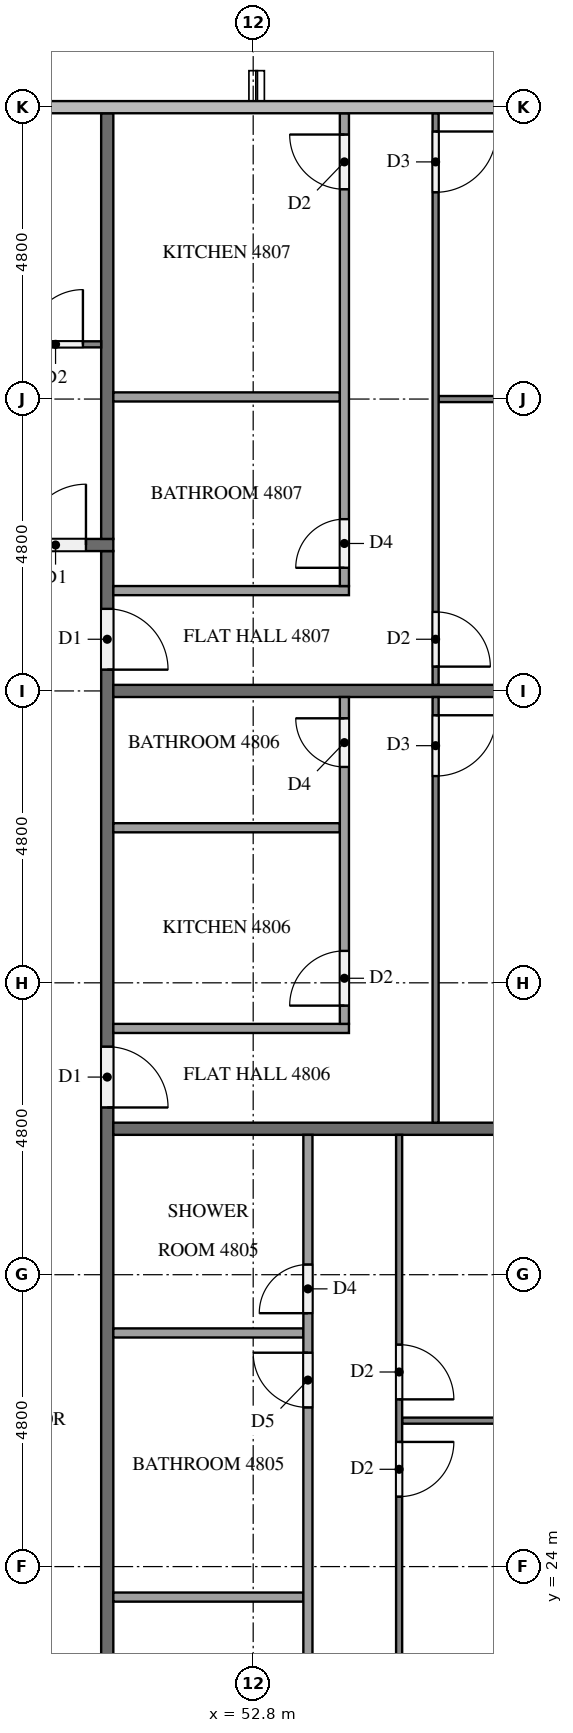
"""IFC4 building model, lengths in metres.
Left out: names, types, materials, properties, quantities, classifications, styles, units other than length and angle.
Written with IfcOpenShell. Run it as: python <this file> out.ifc"""

import sys

from ifc_helpers import new_model, si_unit, direction, frame, frame_2d, origin, place, context, subcontext, project, spatial, rectangle, extrude, element, fill, save


model = new_model("IFC4")
c1 = context("Model", 3, precision=1e-05, world=origin(), true_north=direction((0.0, 1.0)))
c2 = subcontext(c1, "Body", "Model", "MODEL_VIEW")
j1 = project(units=[si_unit("LENGTHUNIT", "METRE"), si_unit("PLANEANGLEUNIT", "RADIAN")], contexts=[c1])
p1 = place(None, origin())
s1 = spatial("IfcSite", under=j1, at=p1, CompositionType="ELEMENT")
p2 = place(p1, origin())
s2 = spatial("IfcBuilding", under=s1, at=p2, CompositionType="ELEMENT")
p3 = place(p2, frame((0.0, 0.0, 185.9)))
s3 = spatial("IfcBuildingStorey", under=s2, at=p3, CompositionType="ELEMENT", Elevation=185.9)
p4 = place(p3, frame((50.4, 40.7, 0.0), z_axis=(0.0, 0.0, 1.0), x_axis=(0.0, -1.0, 0.0)))
e1 = element("IfcWall", 1, at=p4, inside=s3, PredefinedType="PARTITIONING", context=c2, shape_type="SweptSolid", body=[
    extrude(rectangle(XDim=28.6, YDim=0.2, at=frame_2d((14.3, 0.0))), origin(), (0.0, 0.0, 1.0), 3.2),
])
p5 = place(p4, frame((27.3, 0.0, 0.0)))
e2 = element("IfcOpeningElement", 2, at=p5, cuts=e1, PredefinedType="OPENING", context=c2, shape_type="SweptSolid", body=[
    extrude(rectangle(XDim=1.1, YDim=2.1, at=frame_2d((0.55, 1.05))), frame((0.0, 0.11, 0.0), z_axis=(0.0, -1.0, 0.0), x_axis=(1.0, 0.0, 0.0)), (0.0, 0.0, 1.0), 0.22),
])
p6 = place(p4, frame((8.15, 0.0, 0.0)))
e3 = element("IfcOpeningElement", 3, at=p6, cuts=e1, PredefinedType="OPENING", context=c2, shape_type="SweptSolid", body=[
    extrude(rectangle(XDim=1.0, YDim=2.1, at=frame_2d((0.5, 1.05))), frame((0.0, 0.11, 0.0), z_axis=(0.0, -1.0, 0.0), x_axis=(1.0, 0.0, 0.0)), (0.0, 0.0, 1.0), 0.22),
])
p7 = place(p4, frame((0.95, 0.0, 0.0)))
e4 = element("IfcOpeningElement", 4, at=p7, cuts=e1, PredefinedType="OPENING", context=c2, shape_type="SweptSolid", body=[
    extrude(rectangle(XDim=1.0, YDim=2.1, at=frame_2d((0.5, 1.05))), frame((0.0, 0.11, 0.0), z_axis=(0.0, -1.0, 0.0), x_axis=(1.0, 0.0, 0.0)), (0.0, 0.0, 1.0), 0.22),
])
p8 = place(p3, frame((11.9, 40.8, 0.0), z_axis=(0.0, 0.0, 1.0), x_axis=(1.0, 0.0, 0.0)))
e5 = element("IfcWall", 5, at=p8, inside=s3, PredefinedType="PARTITIONING", context=c2, shape_type="SweptSolid", body=[
    extrude(rectangle(XDim=38.6, YDim=0.2, at=frame_2d((19.3, 0.0))), origin(), (0.0, 0.0, 1.0), 3.2),
])
p9 = place(p8, frame((37.15, 0.0, 0.0)))
e6 = element("IfcOpeningElement", 6, at=p9, cuts=e5, PredefinedType="OPENING", context=c2, shape_type="SweptSolid", body=[
    extrude(rectangle(XDim=1.0, YDim=2.1, at=frame_2d((0.5, 1.05))), frame((0.0, 0.11, 0.0), z_axis=(0.0, -1.0, 0.0), x_axis=(1.0, 0.0, 0.0)), (0.0, 0.0, 1.0), 0.22),
])
p10 = place(p8, frame((20.35, 0.0, 0.0)))
e7 = element("IfcOpeningElement", 7, at=p10, cuts=e5, PredefinedType="OPENING", context=c2, shape_type="SweptSolid", body=[
    extrude(rectangle(XDim=1.0, YDim=2.1, at=frame_2d((0.5, 1.05))), frame((0.0, 0.11, 0.0), z_axis=(0.0, -1.0, 0.0), x_axis=(1.0, 0.0, 0.0)), (0.0, 0.0, 1.0), 0.22),
])
p11 = place(p8, frame((13.15, 0.0, 0.0)))
e8 = element("IfcOpeningElement", 8, at=p11, cuts=e5, PredefinedType="OPENING", context=c2, shape_type="SweptSolid", body=[
    extrude(rectangle(XDim=1.0, YDim=2.1, at=frame_2d((0.5, 1.05))), frame((0.0, 0.11, 0.0), z_axis=(0.0, -1.0, 0.0), x_axis=(1.0, 0.0, 0.0)), (0.0, 0.0, 1.0), 0.22),
])
for number, where, z_axis, x_axis in (
    (9, (50.5, 31.2, 0.0), (0.0, 0.0, 1.0), (1.0, 0.0, 0.0)),
    (10, (50.5, 38.4, 0.0), (0.0, 0.0, 1.0), (1.0, 0.0, 0.0)),
):
    element("IfcWall", number, at=place(p3, frame(where, z_axis=z_axis, x_axis=x_axis)), inside=s3, PredefinedType="PARTITIONING", context=c2, shape_type="SweptSolid", body=[
        extrude(rectangle(XDim=11.8, YDim=0.2, at=frame_2d((5.9, 0.0))), origin(), (0.0, 0.0, 1.0), 3.2),
    ])
p12 = place(p3, frame((50.4, 40.9, 0.0), z_axis=(0.0, 0.0, 1.0), x_axis=(0.0, 1.0, 0.0)))
e11 = element("IfcWall", 11, at=p12, inside=s3, PredefinedType="PARTITIONING", context=c2, shape_type="SweptSolid", body=[
    extrude(rectangle(XDim=7.0, YDim=0.2, at=frame_2d((3.5, 0.0))), origin(), (0.0, 0.0, 1.0), 3.2),
])
p13 = place(p3, frame((55.25, 26.4, 0.0), z_axis=(0.0, 0.0, 1.0), x_axis=(1.0, 0.0, 0.0)))
e12 = element("IfcWall", 12, at=p13, inside=s3, PredefinedType="PARTITIONING", context=c2, shape_type="SweptSolid", body=[
    extrude(rectangle(XDim=7.05, YDim=0.1, at=frame_2d((3.525, 0.0))), origin(), (0.0, 0.0, 1.0), 3.2),
])
p14 = place(p3, frame((55.2, 31.1, 0.0), z_axis=(0.0, 0.0, 1.0), x_axis=(0.0, -1.0, 0.0)))
e13 = element("IfcWall", 13, at=p14, inside=s3, PredefinedType="PARTITIONING", context=c2, shape_type="SweptSolid", body=[
    extrude(rectangle(XDim=19.0, YDim=0.1, at=frame_2d((9.5, 0.0))), origin(), (0.0, 0.0, 1.0), 3.2),
])
p15 = place(p14, frame((14.65, 0.0, 0.0)))
e14 = element("IfcOpeningElement", 14, at=p15, cuts=e13, PredefinedType="OPENING", context=c2, shape_type="SweptSolid", body=[
    extrude(rectangle(XDim=0.9, YDim=2.1, at=frame_2d((0.45, 1.05))), frame((0.0, 0.06, 0.0), z_axis=(0.0, -1.0, 0.0), x_axis=(1.0, 0.0, 0.0)), (0.0, 0.0, 1.0), 0.12),
])
p16 = place(p14, frame((12.95, 0.0, 0.0)))
e15 = element("IfcOpeningElement", 15, at=p16, cuts=e13, PredefinedType="OPENING", context=c2, shape_type="SweptSolid", body=[
    extrude(rectangle(XDim=1.0, YDim=2.1, at=frame_2d((0.5, 1.05))), frame((0.0, 0.06, 0.0), z_axis=(0.0, -1.0, 0.0), x_axis=(1.0, 0.0, 0.0)), (0.0, 0.0, 1.0), 0.12),
])
p17 = place(p14, frame((5.05, 0.0, 0.0)))
e16 = element("IfcOpeningElement", 16, at=p17, cuts=e13, PredefinedType="OPENING", context=c2, shape_type="SweptSolid", body=[
    extrude(rectangle(XDim=0.9, YDim=2.1, at=frame_2d((0.45, 1.05))), frame((0.0, 0.06, 0.0), z_axis=(0.0, -1.0, 0.0), x_axis=(1.0, 0.0, 0.0)), (0.0, 0.0, 1.0), 0.12),
])
p18 = place(p14, frame((3.45, 0.0, 0.0)))
e17 = element("IfcOpeningElement", 17, at=p18, cuts=e13, PredefinedType="OPENING", context=c2, shape_type="SweptSolid", body=[
    extrude(rectangle(XDim=0.9, YDim=2.1, at=frame_2d((0.45, 1.05))), frame((0.0, 0.06, 0.0), z_axis=(0.0, -1.0, 0.0), x_axis=(1.0, 0.0, 0.0)), (0.0, 0.0, 1.0), 0.12),
])
for number, where, z_axis, x_axis in (
    (18, (50.5, 23.498, 0.0), (0.0, 0.0, 1.0), (1.0, 0.0, 0.0)),
    (19, (50.5, 27.842, 0.0), (0.0, 0.0, 1.0), (1.0, 0.0, 0.0)),
):
    element("IfcWall", number, at=place(p3, frame(where, z_axis=z_axis, x_axis=x_axis)), inside=s3, PredefinedType="PARTITIONING", context=c2, shape_type="SweptSolid", body=[
        extrude(rectangle(XDim=3.125, YDim=0.15, at=frame_2d((1.562, 0.0))), origin(), (0.0, 0.0, 1.0), 3.2),
    ])
p19 = place(p3, frame((53.7, 13.725, 0.0), z_axis=(0.0, 0.0, 1.0), x_axis=(0.0, 1.0, 0.0)))
e20 = element("IfcWall", 20, at=p19, inside=s3, PredefinedType="PARTITIONING", context=c2, shape_type="SweptSolid", body=[
    extrude(rectangle(XDim=17.375, YDim=0.15, at=frame_2d((8.688, 0.0))), origin(), (0.0, 0.0, 1.0), 3.2),
])
p20 = place(p19, frame((2.133, 0.0, 0.0)))
e21 = element("IfcOpeningElement", 21, at=p20, cuts=e20, PredefinedType="OPENING", context=c2, shape_type="SweptSolid", body=[
    extrude(rectangle(XDim=0.8, YDim=2.1, at=frame_2d((0.4, 1.05))), frame((0.0, 0.085, 0.0), z_axis=(0.0, -1.0, 0.0), x_axis=(1.0, 0.0, 0.0)), (0.0, 0.0, 1.0), 0.17),
])
p21 = place(p19, frame((3.583, 0.0, 0.0)))
e22 = element("IfcOpeningElement", 22, at=p21, cuts=e20, PredefinedType="OPENING", context=c2, shape_type="SweptSolid", body=[
    extrude(rectangle(XDim=0.9, YDim=2.1, at=frame_2d((0.45, 1.05))), frame((0.0, 0.085, 0.0), z_axis=(0.0, -1.0, 0.0), x_axis=(1.0, 0.0, 0.0)), (0.0, 0.0, 1.0), 0.17),
])
p22 = place(p19, frame((12.892, 0.0, 0.0)))
e23 = element("IfcOpeningElement", 23, at=p22, cuts=e20, PredefinedType="OPENING", context=c2, shape_type="SweptSolid", body=[
    extrude(rectangle(XDim=0.9, YDim=2.1, at=frame_2d((0.45, 1.05))), frame((0.0, 0.085, 0.0), z_axis=(0.0, -1.0, 0.0), x_axis=(1.0, 0.0, 0.0)), (0.0, 0.0, 1.0), 0.17),
])
p23 = place(p19, frame((14.442, 0.0, 0.0)))
e24 = element("IfcOpeningElement", 24, at=p23, cuts=e20, PredefinedType="OPENING", context=c2, shape_type="SweptSolid", body=[
    extrude(rectangle(XDim=0.8, YDim=2.1, at=frame_2d((0.4, 1.05))), frame((0.0, 0.085, 0.0), z_axis=(0.0, -1.0, 0.0), x_axis=(1.0, 0.0, 0.0)), (0.0, 0.0, 1.0), 0.17),
])
p24 = place(p3, frame((55.8, 38.3, 0.0), z_axis=(0.0, 0.0, 1.0), x_axis=(0.0, -1.0, 0.0)))
e25 = element("IfcWall", 25, at=p24, inside=s3, PredefinedType="PARTITIONING", context=c2, shape_type="SweptSolid", body=[
    extrude(rectangle(XDim=7.0, YDim=0.1, at=frame_2d((3.5, 0.0))), origin(), (0.0, 0.0, 1.0), 3.2),
])
p25 = place(p24, frame((0.3, 0.0, 0.0)))
e26 = element("IfcOpeningElement", 26, at=p25, cuts=e25, PredefinedType="OPENING", context=c2, shape_type="SweptSolid", body=[
    extrude(rectangle(XDim=1.0, YDim=2.1, at=frame_2d((0.5, 1.05))), frame((0.0, 0.06, 0.0), z_axis=(0.0, -1.0, 0.0), x_axis=(1.0, 0.0, 0.0)), (0.0, 0.0, 1.0), 0.12),
])
p26 = place(p3, frame((50.5, 36.15, 0.0), z_axis=(0.0, 0.0, 1.0), x_axis=(1.0, 0.0, 0.0)))
e27 = element("IfcWall", 27, at=p26, inside=s3, PredefinedType="PARTITIONING", context=c2, shape_type="SweptSolid", body=[
    extrude(rectangle(XDim=3.725, YDim=0.15, at=frame_2d((1.863, 0.0))), origin(), (0.0, 0.0, 1.0), 3.2),
])
p27 = place(p3, frame((50.5, 32.85, 0.0), z_axis=(0.0, 0.0, 1.0), x_axis=(1.0, 0.0, 0.0)))
e28 = element("IfcWall", 28, at=p27, inside=s3, PredefinedType="PARTITIONING", context=c2, shape_type="SweptSolid", body=[
    extrude(rectangle(XDim=3.875, YDim=0.15, at=frame_2d((1.938, 0.0))), origin(), (0.0, 0.0, 1.0), 3.2),
])
p28 = place(p3, frame((54.3, 32.925, 0.0), z_axis=(0.0, 0.0, 1.0), x_axis=(0.0, 1.0, 0.0)))
e29 = element("IfcWall", 29, at=p28, inside=s3, PredefinedType="PARTITIONING", context=c2, shape_type="SweptSolid", body=[
    extrude(rectangle(XDim=5.375, YDim=0.15, at=frame_2d((2.688, 0.0))), origin(), (0.0, 0.0, 1.0), 3.2),
])
p29 = place(p28, frame((0.3, 0.0, 0.0)))
e30 = element("IfcOpeningElement", 30, at=p29, cuts=e29, PredefinedType="OPENING", context=c2, shape_type="SweptSolid", body=[
    extrude(rectangle(XDim=0.9, YDim=2.1, at=frame_2d((0.45, 1.05))), frame((0.0, 0.085, 0.0), z_axis=(0.0, -1.0, 0.0), x_axis=(1.0, 0.0, 0.0)), (0.0, 0.0, 1.0), 0.17),
])
p30 = place(p28, frame((4.225, 0.0, 0.0)))
e31 = element("IfcOpeningElement", 31, at=p30, cuts=e29, PredefinedType="OPENING", context=c2, shape_type="SweptSolid", body=[
    extrude(rectangle(XDim=0.8, YDim=2.1, at=frame_2d((0.4, 1.05))), frame((0.0, 0.085, 0.0), z_axis=(0.0, -1.0, 0.0), x_axis=(1.0, 0.0, 0.0)), (0.0, 0.0, 1.0), 0.17),
])
p31 = place(p3, frame((55.85, 43.2, 0.0), z_axis=(0.0, 0.0, 1.0), x_axis=(1.0, 0.0, 0.0)))
e32 = element("IfcWall", 32, at=p31, inside=s3, PredefinedType="PARTITIONING", context=c2, shape_type="SweptSolid", body=[
    extrude(rectangle(XDim=6.075, YDim=0.1, at=frame_2d((3.038, 0.0))), origin(), (0.0, 0.0, 1.0), 3.2),
])
p32 = place(p3, frame((55.8, 47.9, 0.0), z_axis=(0.0, 0.0, 1.0), x_axis=(0.0, -1.0, 0.0)))
e33 = element("IfcWall", 33, at=p32, inside=s3, PredefinedType="PARTITIONING", context=c2, shape_type="SweptSolid", body=[
    extrude(rectangle(XDim=9.4, YDim=0.1, at=frame_2d((4.7, 0.0))), origin(), (0.0, 0.0, 1.0), 3.2),
])
p33 = place(p32, frame((8.2, 0.0, 0.0)))
e34 = element("IfcOpeningElement", 34, at=p33, cuts=e33, PredefinedType="OPENING", context=c2, shape_type="SweptSolid", body=[
    extrude(rectangle(XDim=0.9, YDim=2.1, at=frame_2d((0.45, 1.05))), frame((0.0, 0.06, 0.0), z_axis=(0.0, -1.0, 0.0), x_axis=(1.0, 0.0, 0.0)), (0.0, 0.0, 1.0), 0.12),
])
p34 = place(p32, frame((0.3, 0.0, 0.0)))
e35 = element("IfcOpeningElement", 35, at=p34, cuts=e33, PredefinedType="OPENING", context=c2, shape_type="SweptSolid", body=[
    extrude(rectangle(XDim=1.0, YDim=2.1, at=frame_2d((0.5, 1.05))), frame((0.0, 0.06, 0.0), z_axis=(0.0, -1.0, 0.0), x_axis=(1.0, 0.0, 0.0)), (0.0, 0.0, 1.0), 0.12),
])
p35 = place(p3, frame((50.5, 43.235, 0.0), z_axis=(0.0, 0.0, 1.0), x_axis=(1.0, 0.0, 0.0)))
e36 = element("IfcWall", 36, at=p35, inside=s3, PredefinedType="PARTITIONING", context=c2, shape_type="SweptSolid", body=[
    extrude(rectangle(XDim=3.725, YDim=0.15, at=frame_2d((1.863, 0.0))), origin(), (0.0, 0.0, 1.0), 3.2),
])
p36 = place(p3, frame((50.5, 40.05, 0.0), z_axis=(0.0, 0.0, 1.0), x_axis=(1.0, 0.0, 0.0)))
e37 = element("IfcWall", 37, at=p36, inside=s3, PredefinedType="PARTITIONING", context=c2, shape_type="SweptSolid", body=[
    extrude(rectangle(XDim=3.875, YDim=0.15, at=frame_2d((1.938, 0.0))), origin(), (0.0, 0.0, 1.0), 3.2),
])
p37 = place(p3, frame((54.3, 40.125, 0.0), z_axis=(0.0, 0.0, 1.0), x_axis=(0.0, 1.0, 0.0)))
e38 = element("IfcWall", 38, at=p37, inside=s3, PredefinedType="PARTITIONING", context=c2, shape_type="SweptSolid", body=[
    extrude(rectangle(XDim=7.775, YDim=0.15, at=frame_2d((3.887, 0.0))), origin(), (0.0, 0.0, 1.0), 3.2),
])
p38 = place(p37, frame((0.3, 0.0, 0.0)))
e39 = element("IfcOpeningElement", 39, at=p38, cuts=e38, PredefinedType="OPENING", context=c2, shape_type="SweptSolid", body=[
    extrude(rectangle(XDim=0.8, YDim=2.1, at=frame_2d((0.4, 1.05))), frame((0.0, 0.085, 0.0), z_axis=(0.0, -1.0, 0.0), x_axis=(1.0, 0.0, 0.0)), (0.0, 0.0, 1.0), 0.17),
])
p39 = place(p37, frame((6.525, 0.0, 0.0)))
e40 = element("IfcOpeningElement", 40, at=p39, cuts=e38, PredefinedType="OPENING", context=c2, shape_type="SweptSolid", body=[
    extrude(rectangle(XDim=0.9, YDim=2.1, at=frame_2d((0.45, 1.05))), frame((0.0, 0.085, 0.0), z_axis=(0.0, -1.0, 0.0), x_axis=(1.0, 0.0, 0.0)), (0.0, 0.0, 1.0), 0.17),
])
p40 = place(p3, frame((33.7, 44.1, 0.0), z_axis=(0.0, 0.0, 1.0), x_axis=(1.0, 0.0, 0.0)))
e41 = element("IfcWall", 41, at=p40, inside=s3, PredefinedType="PARTITIONING", context=c2, shape_type="SweptSolid", body=[
    extrude(rectangle(XDim=16.6, YDim=0.1, at=frame_2d((8.3, 0.0))), origin(), (0.0, 0.0, 1.0), 3.2),
])
p41 = place(p40, frame((15.4, 0.0, 0.0)))
e42 = element("IfcOpeningElement", 42, at=p41, cuts=e41, PredefinedType="OPENING", context=c2, shape_type="SweptSolid", body=[
    extrude(rectangle(XDim=0.9, YDim=2.1, at=frame_2d((0.45, 1.05))), frame((0.0, 0.06, 0.0), z_axis=(0.0, -1.0, 0.0), x_axis=(1.0, 0.0, 0.0)), (0.0, 0.0, 1.0), 0.12),
])
p42 = place(p40, frame((7.45, 0.0, 0.0)))
e43 = element("IfcOpeningElement", 43, at=p42, cuts=e41, PredefinedType="OPENING", context=c2, shape_type="SweptSolid", body=[
    extrude(rectangle(XDim=0.9, YDim=2.1, at=frame_2d((0.45, 1.05))), frame((0.0, 0.06, 0.0), z_axis=(0.0, -1.0, 0.0), x_axis=(1.0, 0.0, 0.0)), (0.0, 0.0, 1.0), 0.12),
])
p43 = place(p40, frame((5.75, 0.0, 0.0)))
e44 = element("IfcOpeningElement", 44, at=p43, cuts=e41, PredefinedType="OPENING", context=c2, shape_type="SweptSolid", body=[
    extrude(rectangle(XDim=1.0, YDim=2.1, at=frame_2d((0.5, 1.05))), frame((0.0, 0.06, 0.0), z_axis=(0.0, -1.0, 0.0), x_axis=(1.0, 0.0, 0.0)), (0.0, 0.0, 1.0), 0.12),
])
p44 = place(p6, origin())
e45 = element("IfcDoor", 45, at=p44, inside=s3, OperationType="SINGLE_SWING_RIGHT", PredefinedType="DOOR", context=c2, shape_type="SweptSolid", body=[
    extrude(rectangle(XDim=1.0, YDim=2.1, at=frame_2d((0.5, 1.05))), frame((0.0, 0.025, 0.0), z_axis=(0.0, -1.0, 0.0), x_axis=(1.0, 0.0, 0.0)), (0.0, 0.0, 1.0), 0.05),
])
fill(e3, e45)
p45 = place(p7, origin())
e46 = element("IfcDoor", 46, at=p45, inside=s3, OperationType="SINGLE_SWING_RIGHT", PredefinedType="DOOR", context=c2, shape_type="SweptSolid", body=[
    extrude(rectangle(XDim=1.0, YDim=2.1, at=frame_2d((0.5, 1.05))), frame((0.0, 0.025, 0.0), z_axis=(0.0, -1.0, 0.0), x_axis=(1.0, 0.0, 0.0)), (0.0, 0.0, 1.0), 0.05),
])
fill(e4, e46)
p46 = place(p9, origin())
e47 = element("IfcDoor", 47, at=p46, inside=s3, OperationType="SINGLE_SWING_RIGHT", PredefinedType="DOOR", context=c2, shape_type="SweptSolid", body=[
    extrude(rectangle(XDim=1.0, YDim=2.1, at=frame_2d((0.5, 1.05))), frame((0.0, 0.025, 0.0), z_axis=(0.0, -1.0, 0.0), x_axis=(1.0, 0.0, 0.0)), (0.0, 0.0, 1.0), 0.05),
])
fill(e6, e47)
p47 = place(p17, origin())
e48 = element("IfcDoor", 48, at=p47, inside=s3, OperationType="SINGLE_SWING_LEFT", PredefinedType="DOOR", context=c2, shape_type="SweptSolid", body=[
    extrude(rectangle(XDim=0.9, YDim=2.1, at=frame_2d((0.45, 1.05))), frame((0.0, 0.025, 0.0), z_axis=(0.0, -1.0, 0.0), x_axis=(1.0, 0.0, 0.0)), (0.0, 0.0, 1.0), 0.05),
])
fill(e16, e48)
p48 = place(p18, origin())
e49 = element("IfcDoor", 49, at=p48, inside=s3, OperationType="SINGLE_SWING_RIGHT", PredefinedType="DOOR", context=c2, shape_type="SweptSolid", body=[
    extrude(rectangle(XDim=0.9, YDim=2.1, at=frame_2d((0.45, 1.05))), frame((0.0, 0.025, 0.0), z_axis=(0.0, -1.0, 0.0), x_axis=(1.0, 0.0, 0.0)), (0.0, 0.0, 1.0), 0.05),
])
fill(e17, e49)
p49 = place(p22, origin())
e50 = element("IfcDoor", 50, at=p49, inside=s3, OperationType="SINGLE_SWING_RIGHT", PredefinedType="DOOR", context=c2, shape_type="SweptSolid", body=[
    extrude(rectangle(XDim=0.9, YDim=2.1, at=frame_2d((0.45, 1.05))), frame((0.0, 0.025, 0.0), z_axis=(0.0, -1.0, 0.0), x_axis=(1.0, 0.0, 0.0)), (0.0, 0.0, 1.0), 0.05),
])
fill(e23, e50)
p50 = place(p23, origin())
e51 = element("IfcDoor", 51, at=p50, inside=s3, OperationType="SINGLE_SWING_LEFT", PredefinedType="DOOR", context=c2, shape_type="SweptSolid", body=[
    extrude(rectangle(XDim=0.8, YDim=2.1, at=frame_2d((0.4, 1.05))), frame((0.0, 0.025, 0.0), z_axis=(0.0, -1.0, 0.0), x_axis=(1.0, 0.0, 0.0)), (0.0, 0.0, 1.0), 0.05),
])
fill(e24, e51)
p51 = place(p25, origin())
e52 = element("IfcDoor", 52, at=p51, inside=s3, OperationType="SINGLE_SWING_LEFT", PredefinedType="DOOR", context=c2, shape_type="SweptSolid", body=[
    extrude(rectangle(XDim=1.0, YDim=2.1, at=frame_2d((0.5, 1.05))), frame((0.0, 0.025, 0.0), z_axis=(0.0, -1.0, 0.0), x_axis=(1.0, 0.0, 0.0)), (0.0, 0.0, 1.0), 0.05),
])
fill(e26, e52)
p52 = place(p29, origin())
e53 = element("IfcDoor", 53, at=p52, inside=s3, OperationType="SINGLE_SWING_LEFT", PredefinedType="DOOR", context=c2, shape_type="SweptSolid", body=[
    extrude(rectangle(XDim=0.9, YDim=2.1, at=frame_2d((0.45, 1.05))), frame((0.0, 0.025, 0.0), z_axis=(0.0, -1.0, 0.0), x_axis=(1.0, 0.0, 0.0)), (0.0, 0.0, 1.0), 0.05),
])
fill(e30, e53)
p53 = place(p30, origin())
e54 = element("IfcDoor", 54, at=p53, inside=s3, OperationType="SINGLE_SWING_RIGHT", PredefinedType="DOOR", context=c2, shape_type="SweptSolid", body=[
    extrude(rectangle(XDim=0.8, YDim=2.1, at=frame_2d((0.4, 1.05))), frame((0.0, 0.025, 0.0), z_axis=(0.0, -1.0, 0.0), x_axis=(1.0, 0.0, 0.0)), (0.0, 0.0, 1.0), 0.05),
])
fill(e31, e54)
p54 = place(p33, origin())
e55 = element("IfcDoor", 55, at=p54, inside=s3, OperationType="SINGLE_SWING_RIGHT", PredefinedType="DOOR", context=c2, shape_type="SweptSolid", body=[
    extrude(rectangle(XDim=0.9, YDim=2.1, at=frame_2d((0.45, 1.05))), frame((0.0, 0.025, 0.0), z_axis=(0.0, -1.0, 0.0), x_axis=(1.0, 0.0, 0.0)), (0.0, 0.0, 1.0), 0.05),
])
fill(e34, e55)
p55 = place(p34, origin())
e56 = element("IfcDoor", 56, at=p55, inside=s3, OperationType="SINGLE_SWING_LEFT", PredefinedType="DOOR", context=c2, shape_type="SweptSolid", body=[
    extrude(rectangle(XDim=1.0, YDim=2.1, at=frame_2d((0.5, 1.05))), frame((0.0, 0.025, 0.0), z_axis=(0.0, -1.0, 0.0), x_axis=(1.0, 0.0, 0.0)), (0.0, 0.0, 1.0), 0.05),
])
fill(e35, e56)
p56 = place(p38, origin())
e57 = element("IfcDoor", 57, at=p56, inside=s3, OperationType="SINGLE_SWING_LEFT", PredefinedType="DOOR", context=c2, shape_type="SweptSolid", body=[
    extrude(rectangle(XDim=0.8, YDim=2.1, at=frame_2d((0.4, 1.05))), frame((0.0, 0.025, 0.0), z_axis=(0.0, -1.0, 0.0), x_axis=(1.0, 0.0, 0.0)), (0.0, 0.0, 1.0), 0.05),
])
fill(e39, e57)
p57 = place(p39, origin())
e58 = element("IfcDoor", 58, at=p57, inside=s3, OperationType="SINGLE_SWING_RIGHT", PredefinedType="DOOR", context=c2, shape_type="SweptSolid", body=[
    extrude(rectangle(XDim=0.9, YDim=2.1, at=frame_2d((0.45, 1.05))), frame((0.0, 0.025, 0.0), z_axis=(0.0, -1.0, 0.0), x_axis=(1.0, 0.0, 0.0)), (0.0, 0.0, 1.0), 0.05),
])
fill(e40, e58)
p58 = place(p41, origin())
e59 = element("IfcDoor", 59, at=p58, inside=s3, OperationType="SINGLE_SWING_RIGHT", PredefinedType="DOOR", context=c2, shape_type="SweptSolid", body=[
    extrude(rectangle(XDim=0.9, YDim=2.1, at=frame_2d((0.45, 1.05))), frame((0.0, 0.025, 0.0), z_axis=(0.0, -1.0, 0.0), x_axis=(1.0, 0.0, 0.0)), (0.0, 0.0, 1.0), 0.05),
])
fill(e42, e59)
save(model, sys.argv[1])
